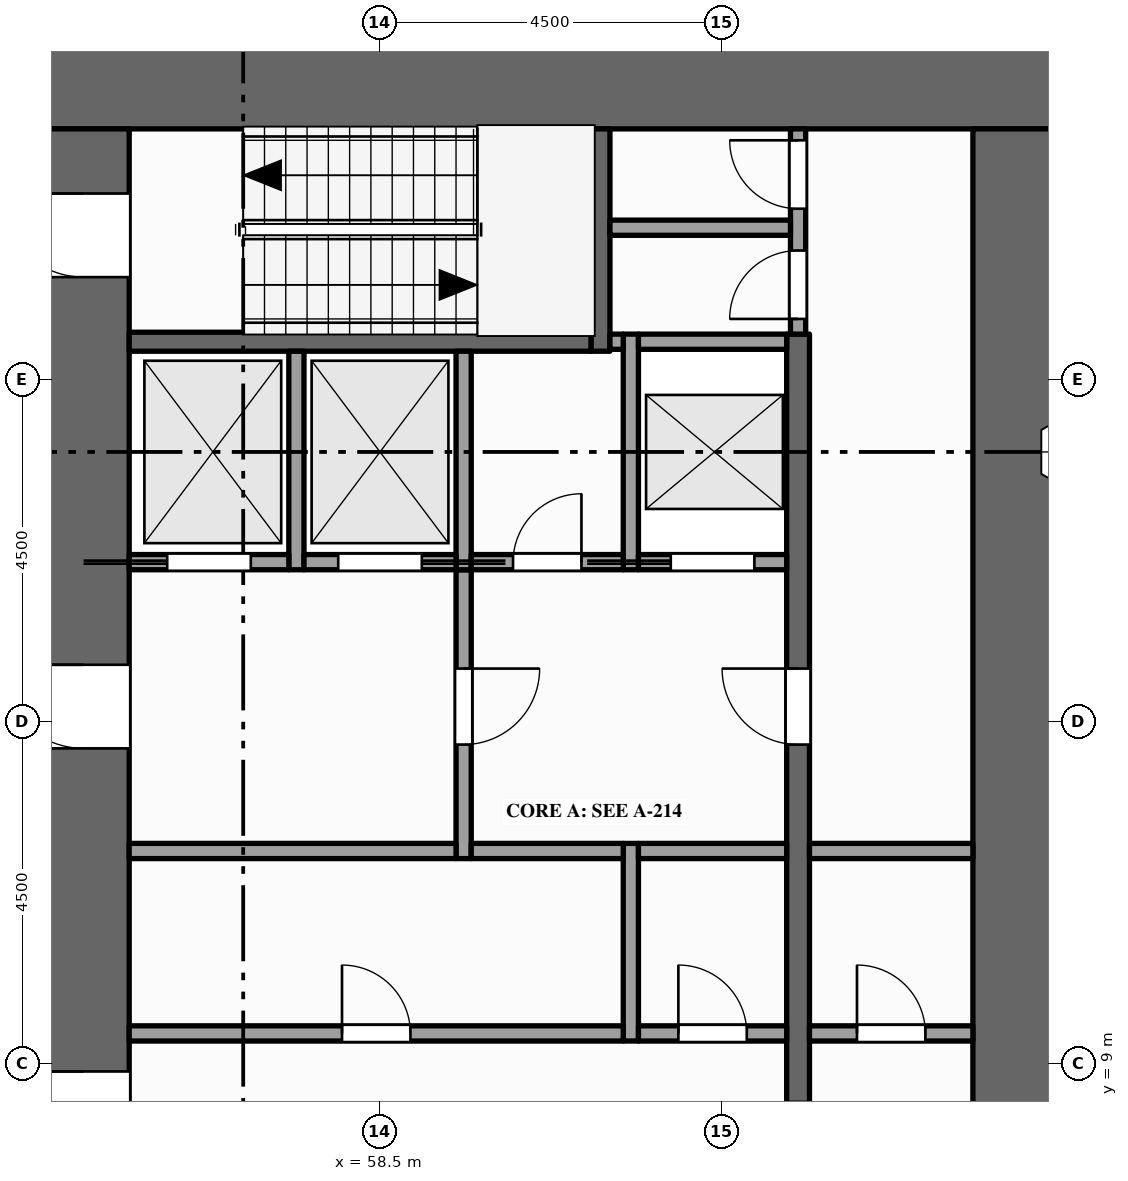
"""IFC4 building model, lengths in metres.
Left out: names, types, materials, properties, quantities, classifications, styles, units other than length and angle.
Written with IfcOpenShell. Run it as: python <this file> out.ifc"""

import sys

from ifc_helpers import new_model, si_unit, direction, frame, frame_2d, origin, place, context, subcontext, project, spatial, rectangle, extrude, element, fill, save


model = new_model("IFC4")
c1 = context("Model", 3, precision=1e-05, world=origin(), true_north=direction((0.0, 1.0)))
c2 = subcontext(c1, "Body", "Model", "MODEL_VIEW")
j1 = project(units=[si_unit("LENGTHUNIT", "METRE"), si_unit("PLANEANGLEUNIT", "RADIAN")], contexts=[c1])
p1 = place(None, origin())
s1 = spatial("IfcSite", under=j1, at=p1, CompositionType="ELEMENT")
p2 = place(p1, origin())
s2 = spatial("IfcBuilding", under=s1, at=p2, CompositionType="ELEMENT")
p3 = place(p2, frame((0.0, 0.0, 73.0)))
s3 = spatial("IfcBuildingStorey", under=s2, at=p3, CompositionType="ELEMENT", Elevation=73.0)
p4 = place(p3, frame((54.0, 21.9, -0.15), z_axis=(0.0, 0.0, 1.0), x_axis=(1.0, 0.0, 0.0)))
e1 = element("IfcWall", 1, at=p4, inside=s3, PredefinedType="SHEAR", context=c2, shape_type="SweptSolid", body=[
    extrude(rectangle(XDim=13.5, YDim=1.2, at=frame_2d((6.75, 0.0))), origin(), (0.0, 0.0, 1.0), 4.0),
])
p5 = place(p3, frame((54.6, 1.2, -0.15), z_axis=(0.0, 0.0, 1.0), x_axis=(0.0, 1.0, 0.0)))
e2 = element("IfcWall", 2, at=p5, inside=s3, PredefinedType="SHEAR", context=c2, shape_type="SweptSolid", body=[
    extrude(rectangle(XDim=20.1, YDim=1.2, at=frame_2d((10.05, 0.0))), origin(), (0.0, 0.0, 1.0), 4.0),
])
p6 = place(p5, frame((5.9, 0.0, 0.15)))
e3 = element("IfcOpeningElement", 3, at=p6, cuts=e2, PredefinedType="OPENING", context=c2, shape_type="SweptSolid", body=[
    extrude(rectangle(XDim=1.8, YDim=2.1, at=frame_2d((0.9, 1.05))), frame((0.0, 0.61, 0.0), z_axis=(0.0, -1.0, 0.0), x_axis=(1.0, 0.0, 0.0)), (0.0, 0.0, 1.0), 1.22),
])
p7 = place(p5, frame((11.95, 0.0, 0.15)))
e4 = element("IfcOpeningElement", 4, at=p7, cuts=e2, PredefinedType="OPENING", context=c2, shape_type="SweptSolid", body=[
    extrude(rectangle(XDim=1.1, YDim=2.1, at=frame_2d((0.55, 1.05))), frame((0.0, 0.61, 0.0), z_axis=(0.0, -1.0, 0.0), x_axis=(1.0, 0.0, 0.0)), (0.0, 0.0, 1.0), 1.22),
])
p8 = place(p5, frame((0.95, 0.0, 0.15)))
e5 = element("IfcOpeningElement", 5, at=p8, cuts=e2, PredefinedType="OPENING", context=c2, shape_type="SweptSolid", body=[
    extrude(rectangle(XDim=1.1, YDim=2.1, at=frame_2d((0.55, 1.05))), frame((0.0, 0.61, 0.0), z_axis=(0.0, -1.0, 0.0), x_axis=(1.0, 0.0, 0.0)), (0.0, 0.0, 1.0), 1.22),
])
p9 = place(p5, frame((18.15, 0.0, 0.15)))
e6 = element("IfcOpeningElement", 6, at=p9, cuts=e2, PredefinedType="OPENING", context=c2, shape_type="SweptSolid", body=[
    extrude(rectangle(XDim=1.1, YDim=2.1, at=frame_2d((0.55, 1.05))), frame((0.0, 0.61, 0.0), z_axis=(0.0, -1.0, 0.0), x_axis=(1.0, 0.0, 0.0)), (0.0, 0.0, 1.0), 1.22),
])
p10 = place(p3, frame((66.9, 1.2, -0.15), z_axis=(0.0, 0.0, 1.0), x_axis=(0.0, 1.0, 0.0)))
e7 = element("IfcWall", 7, at=p10, inside=s3, PredefinedType="SHEAR", context=c2, shape_type="SweptSolid", body=[
    extrude(rectangle(XDim=20.1, YDim=1.2, at=frame_2d((10.05, 0.0))), origin(), (0.0, 0.0, 1.0), 4.0),
])
p11 = place(p3, frame((57.4, 15.5, 0.0), z_axis=(0.0, 0.0, 1.0), x_axis=(0.0, 1.0, 0.0)))
e8 = element("IfcWall", 8, at=p11, inside=s3, PredefinedType="SOLIDWALL", context=c2, shape_type="SweptSolid", body=[
    extrude(rectangle(XDim=2.875, YDim=0.2, at=frame_2d((1.438, 0.0))), origin(), (0.0, 0.0, 1.0), 3.75),
])
p12 = place(p3, frame((59.6, 11.7, 0.0), z_axis=(0.0, 0.0, 1.0), x_axis=(0.0, 1.0, 0.0)))
e9 = element("IfcWall", 9, at=p12, inside=s3, PredefinedType="PARTITIONING", context=c2, shape_type="SweptSolid", body=[
    extrude(rectangle(XDim=3.8, YDim=0.2, at=frame_2d((1.9, 0.0))), origin(), (0.0, 0.0, 1.0), 3.75),
])
p13 = place(p12, frame((1.5, 0.0, 0.0)))
e10 = element("IfcOpeningElement", 10, at=p13, cuts=e9, PredefinedType="OPENING", context=c2, shape_type="SweptSolid", body=[
    extrude(rectangle(XDim=1.0, YDim=2.1, at=frame_2d((0.5, 1.05))), frame((0.0, 0.11, 0.0), z_axis=(0.0, -1.0, 0.0), x_axis=(1.0, 0.0, 0.0)), (0.0, 0.0, 1.0), 0.22),
])
p14 = place(p3, frame((59.6, 15.5, 0.0), z_axis=(0.0, 0.0, 1.0), x_axis=(0.0, 1.0, 0.0)))
e11 = element("IfcWall", 11, at=p14, inside=s3, PredefinedType="SOLIDWALL", context=c2, shape_type="SweptSolid", body=[
    extrude(rectangle(XDim=2.875, YDim=0.2, at=frame_2d((1.438, 0.0))), origin(), (0.0, 0.0, 1.0), 3.75),
])
p15 = place(p3, frame((61.4, 18.375, 0.0), z_axis=(0.0, 0.0, 1.0), x_axis=(0.0, 1.0, 0.0)))
e12 = element("IfcWall", 12, at=p15, inside=s3, PredefinedType="SHEAR", context=c2, shape_type="SweptSolid", body=[
    extrude(rectangle(XDim=2.925, YDim=0.25, at=frame_2d((1.462, 0.0))), origin(), (0.0, 0.0, 1.0), 3.75),
])
p16 = place(p3, frame((61.8, 9.3, 0.0), z_axis=(0.0, 0.0, 1.0), x_axis=(0.0, 1.0, 0.0)))
e13 = element("IfcWall", 13, at=p16, inside=s3, PredefinedType="PARTITIONING", context=c2, shape_type="SweptSolid", body=[
    extrude(rectangle(XDim=2.6, YDim=0.2, at=frame_2d((1.3, 0.0))), origin(), (0.0, 0.0, 1.0), 3.75),
])
p17 = place(p3, frame((61.8, 15.5, 0.0), z_axis=(0.0, 0.0, 1.0), x_axis=(0.0, 1.0, 0.0)))
e14 = element("IfcWall", 14, at=p17, inside=s3, PredefinedType="SOLIDWALL", context=c2, shape_type="SweptSolid", body=[
    extrude(rectangle(XDim=3.1, YDim=0.2, at=frame_2d((1.55, 0.0))), origin(), (0.0, 0.0, 1.0), 3.75),
])
p18 = place(p3, frame((64.0, 4.1, 0.0), z_axis=(0.0, 0.0, 1.0), x_axis=(0.0, 1.0, 0.0)))
e15 = element("IfcWall", 15, at=p18, inside=s3, PredefinedType="SHEAR", context=c2, shape_type="SweptSolid", body=[
    extrude(rectangle(XDim=14.5, YDim=0.3, at=frame_2d((7.25, 0.0))), origin(), (0.0, 0.0, 1.0), 3.75),
])
p19 = place(p18, frame((3.4, 0.0, 0.0)))
e16 = element("IfcOpeningElement", 16, at=p19, cuts=e15, PredefinedType="OPENING", context=c2, shape_type="SweptSolid", body=[
    extrude(rectangle(XDim=1.0, YDim=2.1, at=frame_2d((0.5, 1.05))), frame((0.0, 0.16, 0.0), z_axis=(0.0, -1.0, 0.0), x_axis=(1.0, 0.0, 0.0)), (0.0, 0.0, 1.0), 0.32),
])
p20 = place(p18, frame((9.1, 0.0, 0.0)))
e17 = element("IfcOpeningElement", 17, at=p20, cuts=e15, PredefinedType="OPENING", context=c2, shape_type="SweptSolid", body=[
    extrude(rectangle(XDim=1.0, YDim=2.1, at=frame_2d((0.5, 1.05))), frame((0.0, 0.16, 0.0), z_axis=(0.0, -1.0, 0.0), x_axis=(1.0, 0.0, 0.0)), (0.0, 0.0, 1.0), 0.32),
])
p21 = place(p3, frame((64.0, 18.6, 0.0), z_axis=(0.0, 0.0, 1.0), x_axis=(0.0, 1.0, 0.0)))
e18 = element("IfcWall", 18, at=p21, inside=s3, PredefinedType="PARTITIONING", context=c2, shape_type="SweptSolid", body=[
    extrude(rectangle(XDim=2.7, YDim=0.2, at=frame_2d((1.35, 0.0))), origin(), (0.0, 0.0, 1.0), 3.75),
])
p22 = place(p21, frame((0.2, 0.0, 0.0)))
e19 = element("IfcOpeningElement", 19, at=p22, cuts=e18, PredefinedType="OPENING", context=c2, shape_type="SweptSolid", body=[
    extrude(rectangle(XDim=0.9, YDim=2.1, at=frame_2d((0.45, 1.05))), frame((0.0, 0.11, 0.0), z_axis=(0.0, -1.0, 0.0), x_axis=(1.0, 0.0, 0.0)), (0.0, 0.0, 1.0), 0.22),
])
p23 = place(p21, frame((1.65, 0.0, 0.0)))
e20 = element("IfcOpeningElement", 20, at=p23, cuts=e18, PredefinedType="OPENING", context=c2, shape_type="SweptSolid", body=[
    extrude(rectangle(XDim=0.9, YDim=2.1, at=frame_2d((0.45, 1.05))), frame((0.0, 0.11, 0.0), z_axis=(0.0, -1.0, 0.0), x_axis=(1.0, 0.0, 0.0)), (0.0, 0.0, 1.0), 0.22),
])
p24 = place(p3, frame((55.2, 9.4, 0.0), z_axis=(0.0, 0.0, 1.0), x_axis=(1.0, 0.0, 0.0)))
e21 = element("IfcWall", 21, at=p24, inside=s3, PredefinedType="PARTITIONING", context=c2, shape_type="SweptSolid", body=[
    extrude(rectangle(XDim=6.5, YDim=0.2, at=frame_2d((3.25, 0.0))), origin(), (0.0, 0.0, 1.0), 3.75),
])
p25 = place(p24, frame((2.8, 0.0, 0.0)))
e22 = element("IfcOpeningElement", 22, at=p25, cuts=e21, PredefinedType="OPENING", context=c2, shape_type="SweptSolid", body=[
    extrude(rectangle(XDim=0.9, YDim=2.1, at=frame_2d((0.45, 1.05))), frame((0.0, 0.11, 0.0), z_axis=(0.0, -1.0, 0.0), x_axis=(1.0, 0.0, 0.0)), (0.0, 0.0, 1.0), 0.22),
])
p26 = place(p3, frame((61.9, 9.4, 0.0), z_axis=(0.0, 0.0, 1.0), x_axis=(1.0, 0.0, 0.0)))
e23 = element("IfcWall", 23, at=p26, inside=s3, PredefinedType="PARTITIONING", context=c2, shape_type="SweptSolid", body=[
    extrude(rectangle(XDim=1.95, YDim=0.2, at=frame_2d((0.975, 0.0))), origin(), (0.0, 0.0, 1.0), 3.75),
])
p27 = place(p26, frame((0.525, 0.0, 0.0)))
e24 = element("IfcOpeningElement", 24, at=p27, cuts=e23, PredefinedType="OPENING", context=c2, shape_type="SweptSolid", body=[
    extrude(rectangle(XDim=0.9, YDim=2.1, at=frame_2d((0.45, 1.05))), frame((0.0, 0.11, 0.0), z_axis=(0.0, -1.0, 0.0), x_axis=(1.0, 0.0, 0.0)), (0.0, 0.0, 1.0), 0.22),
])
p28 = place(p3, frame((64.15, 9.4, 0.0), z_axis=(0.0, 0.0, 1.0), x_axis=(1.0, 0.0, 0.0)))
e25 = element("IfcWall", 25, at=p28, inside=s3, PredefinedType="PARTITIONING", context=c2, shape_type="SweptSolid", body=[
    extrude(rectangle(XDim=2.15, YDim=0.2, at=frame_2d((1.075, 0.0))), origin(), (0.0, 0.0, 1.0), 3.75),
])
p29 = place(p28, frame((0.625, 0.0, 0.0)))
e26 = element("IfcOpeningElement", 26, at=p29, cuts=e25, PredefinedType="OPENING", context=c2, shape_type="SweptSolid", body=[
    extrude(rectangle(XDim=0.9, YDim=2.1, at=frame_2d((0.45, 1.05))), frame((0.0, 0.11, 0.0), z_axis=(0.0, -1.0, 0.0), x_axis=(1.0, 0.0, 0.0)), (0.0, 0.0, 1.0), 0.22),
])
p30 = place(p3, frame((55.2, 11.8, 0.0), z_axis=(0.0, 0.0, 1.0), x_axis=(1.0, 0.0, 0.0)))
e27 = element("IfcWall", 27, at=p30, inside=s3, PredefinedType="PARTITIONING", context=c2, shape_type="SweptSolid", body=[
    extrude(rectangle(XDim=4.3, YDim=0.2, at=frame_2d((2.15, 0.0))), origin(), (0.0, 0.0, 1.0), 3.75),
])
p31 = place(p3, frame((59.7, 11.8, 0.0), z_axis=(0.0, 0.0, 1.0), x_axis=(1.0, 0.0, 0.0)))
e28 = element("IfcWall", 28, at=p31, inside=s3, PredefinedType="PARTITIONING", context=c2, shape_type="SweptSolid", body=[
    extrude(rectangle(XDim=2.0, YDim=0.2, at=frame_2d((1.0, 0.0))), origin(), (0.0, 0.0, 1.0), 3.75),
])
p32 = place(p3, frame((61.9, 11.8, 0.0), z_axis=(0.0, 0.0, 1.0), x_axis=(1.0, 0.0, 0.0)))
e29 = element("IfcWall", 29, at=p32, inside=s3, PredefinedType="PARTITIONING", context=c2, shape_type="SweptSolid", body=[
    extrude(rectangle(XDim=1.95, YDim=0.2, at=frame_2d((0.975, 0.0))), origin(), (0.0, 0.0, 1.0), 3.75),
])
p33 = place(p3, frame((64.15, 11.8, 0.0), z_axis=(0.0, 0.0, 1.0), x_axis=(1.0, 0.0, 0.0)))
e30 = element("IfcWall", 30, at=p33, inside=s3, PredefinedType="PARTITIONING", context=c2, shape_type="SweptSolid", body=[
    extrude(rectangle(XDim=2.15, YDim=0.2, at=frame_2d((1.075, 0.0))), origin(), (0.0, 0.0, 1.0), 3.75),
])
p34 = place(p3, frame((55.2, 15.6, 0.0), z_axis=(0.0, 0.0, 1.0), x_axis=(1.0, 0.0, 0.0)))
e31 = element("IfcWall", 31, at=p34, inside=s3, PredefinedType="SOLIDWALL", context=c2, shape_type="SweptSolid", body=[
    extrude(rectangle(XDim=2.1, YDim=0.2, at=frame_2d((1.05, 0.0))), origin(), (0.0, 0.0, 1.0), 3.75),
])
p35 = place(p34, frame((0.5, 0.0, 0.012)))
e32 = element("IfcOpeningElement", 32, at=p35, cuts=e31, PredefinedType="OPENING", context=c2, shape_type="SweptSolid", body=[
    extrude(rectangle(XDim=1.1, YDim=2.1, at=frame_2d((0.55, 1.05))), frame((0.0, 0.11, 0.0), z_axis=(0.0, -1.0, 0.0), x_axis=(1.0, 0.0, 0.0)), (0.0, 0.0, 1.0), 0.22),
])
p36 = place(p3, frame((57.5, 15.6, 0.0), z_axis=(0.0, 0.0, 1.0), x_axis=(1.0, 0.0, 0.0)))
e33 = element("IfcWall", 33, at=p36, inside=s3, PredefinedType="SOLIDWALL", context=c2, shape_type="SweptSolid", body=[
    extrude(rectangle(XDim=2.0, YDim=0.2, at=frame_2d((1.0, 0.0))), origin(), (0.0, 0.0, 1.0), 3.75),
])
p37 = place(p36, frame((0.45, 0.0, 0.012)))
e34 = element("IfcOpeningElement", 34, at=p37, cuts=e33, PredefinedType="OPENING", context=c2, shape_type="SweptSolid", body=[
    extrude(rectangle(XDim=1.1, YDim=2.1, at=frame_2d((0.55, 1.05))), frame((0.0, 0.11, 0.0), z_axis=(0.0, -1.0, 0.0), x_axis=(1.0, 0.0, 0.0)), (0.0, 0.0, 1.0), 0.22),
])
p38 = place(p3, frame((59.7, 15.6, 0.0), z_axis=(0.0, 0.0, 1.0), x_axis=(1.0, 0.0, 0.0)))
e35 = element("IfcWall", 35, at=p38, inside=s3, PredefinedType="PARTITIONING", context=c2, shape_type="SweptSolid", body=[
    extrude(rectangle(XDim=2.0, YDim=0.2, at=frame_2d((1.0, 0.0))), origin(), (0.0, 0.0, 1.0), 3.75),
])
p39 = place(p38, frame((0.55, 0.0, 0.0)))
e36 = element("IfcOpeningElement", 36, at=p39, cuts=e35, PredefinedType="OPENING", context=c2, shape_type="SweptSolid", body=[
    extrude(rectangle(XDim=0.9, YDim=2.1, at=frame_2d((0.45, 1.05))), frame((0.0, 0.11, 0.0), z_axis=(0.0, -1.0, 0.0), x_axis=(1.0, 0.0, 0.0)), (0.0, 0.0, 1.0), 0.22),
])
p40 = place(p3, frame((61.9, 15.6, 0.0), z_axis=(0.0, 0.0, 1.0), x_axis=(1.0, 0.0, 0.0)))
e37 = element("IfcWall", 37, at=p40, inside=s3, PredefinedType="SOLIDWALL", context=c2, shape_type="SweptSolid", body=[
    extrude(rectangle(XDim=1.95, YDim=0.2, at=frame_2d((0.975, 0.0))), origin(), (0.0, 0.0, 1.0), 3.75),
])
p41 = place(p40, frame((0.425, 0.0, 0.012)))
e38 = element("IfcOpeningElement", 38, at=p41, cuts=e37, PredefinedType="OPENING", context=c2, shape_type="SweptSolid", body=[
    extrude(rectangle(XDim=1.1, YDim=2.1, at=frame_2d((0.55, 1.05))), frame((0.0, 0.11, 0.0), z_axis=(0.0, -1.0, 0.0), x_axis=(1.0, 0.0, 0.0)), (0.0, 0.0, 1.0), 0.22),
])
p42 = place(p3, frame((55.2, 18.5, 0.0), z_axis=(0.0, 0.0, 1.0), x_axis=(1.0, 0.0, 0.0)))
e39 = element("IfcWall", 39, at=p42, inside=s3, PredefinedType="SHEAR", context=c2, shape_type="SweptSolid", body=[
    extrude(rectangle(XDim=6.075, YDim=0.25, at=frame_2d((3.038, 0.0))), origin(), (0.0, 0.0, 1.0), 3.75),
])
p43 = place(p3, frame((61.525, 18.5, 0.0), z_axis=(0.0, 0.0, 1.0), x_axis=(1.0, 0.0, 0.0)))
e40 = element("IfcWall", 40, at=p43, inside=s3, PredefinedType="PARTITIONING", context=c2, shape_type="SweptSolid", body=[
    extrude(rectangle(XDim=0.175, YDim=0.2, at=frame_2d((0.087, 0.0))), origin(), (0.0, 0.0, 1.0), 3.75),
])
p44 = place(p3, frame((61.9, 18.5, 0.0), z_axis=(0.0, 0.0, 1.0), x_axis=(1.0, 0.0, 0.0)))
e41 = element("IfcWall", 41, at=p44, inside=s3, PredefinedType="SOLIDWALL", context=c2, shape_type="SweptSolid", body=[
    extrude(rectangle(XDim=1.95, YDim=0.2, at=frame_2d((0.975, 0.0))), origin(), (0.0, 0.0, 1.0), 3.75),
])
p45 = place(p3, frame((61.525, 20.0, 0.0), z_axis=(0.0, 0.0, 1.0), x_axis=(1.0, 0.0, 0.0)))
e42 = element("IfcWall", 42, at=p45, inside=s3, PredefinedType="PARTITIONING", context=c2, shape_type="SweptSolid", body=[
    extrude(rectangle(XDim=2.375, YDim=0.2, at=frame_2d((1.188, 0.0))), origin(), (0.0, 0.0, 1.0), 3.75),
])
p46 = place(p35, origin())
e43 = element("IfcDoor", 43, at=p46, inside=s3, OperationType="SLIDING_TO_LEFT", PredefinedType="DOOR", context=c2, shape_type="SweptSolid", body=[
    extrude(rectangle(XDim=1.1, YDim=2.1, at=frame_2d((0.55, 1.05))), frame((0.0, 0.025, 0.0), z_axis=(0.0, -1.0, 0.0), x_axis=(1.0, 0.0, 0.0)), (0.0, 0.0, 1.0), 0.05),
])
fill(e32, e43)
p47 = place(p37, origin())
e44 = element("IfcDoor", 44, at=p47, inside=s3, OperationType="SLIDING_TO_RIGHT", PredefinedType="DOOR", context=c2, shape_type="SweptSolid", body=[
    extrude(rectangle(XDim=1.1, YDim=2.1, at=frame_2d((0.55, 1.05))), frame((0.0, 0.025, 0.0), z_axis=(0.0, -1.0, 0.0), x_axis=(1.0, 0.0, 0.0)), (0.0, 0.0, 1.0), 0.05),
])
fill(e34, e44)
p48 = place(p41, origin())
e45 = element("IfcDoor", 45, at=p48, inside=s3, OperationType="SLIDING_TO_LEFT", PredefinedType="DOOR", context=c2, shape_type="SweptSolid", body=[
    extrude(rectangle(XDim=1.1, YDim=2.1, at=frame_2d((0.55, 1.05))), frame((0.0, 0.025, 0.0), z_axis=(0.0, -1.0, 0.0), x_axis=(1.0, 0.0, 0.0)), (0.0, 0.0, 1.0), 0.05),
])
fill(e38, e45)
p49 = place(p6, origin())
e46 = element("IfcDoor", 46, at=p49, inside=s3, OperationType="DOUBLE_DOOR_SINGLE_SWING", PredefinedType="DOOR", context=c2, shape_type="SweptSolid", body=[
    extrude(rectangle(XDim=1.8, YDim=2.1, at=frame_2d((0.9, 1.05))), frame((0.0, 0.025, 0.0), z_axis=(0.0, -1.0, 0.0), x_axis=(1.0, 0.0, 0.0)), (0.0, 0.0, 1.0), 0.05),
])
fill(e3, e46)
p50 = place(p7, origin())
e47 = element("IfcDoor", 47, at=p50, inside=s3, OperationType="SINGLE_SWING_RIGHT", PredefinedType="DOOR", context=c2, shape_type="SweptSolid", body=[
    extrude(rectangle(XDim=1.1, YDim=2.1, at=frame_2d((0.55, 1.05))), frame((0.0, 0.025, 0.0), z_axis=(0.0, -1.0, 0.0), x_axis=(1.0, 0.0, 0.0)), (0.0, 0.0, 1.0), 0.05),
])
fill(e4, e47)
p51 = place(p13, origin())
e48 = element("IfcDoor", 48, at=p51, inside=s3, OperationType="SINGLE_SWING_RIGHT", PredefinedType="DOOR", context=c2, shape_type="SweptSolid", body=[
    extrude(rectangle(XDim=1.0, YDim=2.1, at=frame_2d((0.5, 1.05))), frame((0.0, 0.025, 0.0), z_axis=(0.0, -1.0, 0.0), x_axis=(1.0, 0.0, 0.0)), (0.0, 0.0, 1.0), 0.05),
])
fill(e10, e48)
p52 = place(p20, origin())
e49 = element("IfcDoor", 49, at=p52, inside=s3, OperationType="SINGLE_SWING_RIGHT", PredefinedType="DOOR", context=c2, shape_type="SweptSolid", body=[
    extrude(rectangle(XDim=1.0, YDim=2.1, at=frame_2d((0.5, 1.05))), frame((0.0, 0.025, 0.0), z_axis=(0.0, -1.0, 0.0), x_axis=(1.0, 0.0, 0.0)), (0.0, 0.0, 1.0), 0.05),
])
fill(e17, e49)
p53 = place(p29, origin())
e50 = element("IfcDoor", 50, at=p53, inside=s3, OperationType="SINGLE_SWING_LEFT", PredefinedType="DOOR", context=c2, shape_type="SweptSolid", body=[
    extrude(rectangle(XDim=0.9, YDim=2.1, at=frame_2d((0.45, 1.05))), frame((0.0, 0.025, 0.0), z_axis=(0.0, -1.0, 0.0), x_axis=(1.0, 0.0, 0.0)), (0.0, 0.0, 1.0), 0.05),
])
fill(e26, e50)
p54 = place(p9, origin())
e51 = element("IfcDoor", 51, at=p54, inside=s3, OperationType="SINGLE_SWING_RIGHT", PredefinedType="DOOR", context=c2, shape_type="SweptSolid", body=[
    extrude(rectangle(XDim=1.1, YDim=2.1, at=frame_2d((0.55, 1.05))), frame((0.0, 0.025, 0.0), z_axis=(0.0, -1.0, 0.0), x_axis=(1.0, 0.0, 0.0)), (0.0, 0.0, 1.0), 0.05),
])
fill(e6, e51)
p55 = place(p22, origin())
e52 = element("IfcDoor", 52, at=p55, inside=s3, OperationType="SINGLE_SWING_LEFT", PredefinedType="DOOR", context=c2, shape_type="SweptSolid", body=[
    extrude(rectangle(XDim=0.9, YDim=2.1, at=frame_2d((0.45, 1.05))), frame((0.0, 0.025, 0.0), z_axis=(0.0, -1.0, 0.0), x_axis=(1.0, 0.0, 0.0)), (0.0, 0.0, 1.0), 0.05),
])
fill(e19, e52)
p56 = place(p23, origin())
e53 = element("IfcDoor", 53, at=p56, inside=s3, OperationType="SINGLE_SWING_RIGHT", PredefinedType="DOOR", context=c2, shape_type="SweptSolid", body=[
    extrude(rectangle(XDim=0.9, YDim=2.1, at=frame_2d((0.45, 1.05))), frame((0.0, 0.025, 0.0), z_axis=(0.0, -1.0, 0.0), x_axis=(1.0, 0.0, 0.0)), (0.0, 0.0, 1.0), 0.05),
])
fill(e20, e53)
p57 = place(p25, origin())
e54 = element("IfcDoor", 54, at=p57, inside=s3, OperationType="SINGLE_SWING_LEFT", PredefinedType="DOOR", context=c2, shape_type="SweptSolid", body=[
    extrude(rectangle(XDim=0.9, YDim=2.1, at=frame_2d((0.45, 1.05))), frame((0.0, 0.025, 0.0), z_axis=(0.0, -1.0, 0.0), x_axis=(1.0, 0.0, 0.0)), (0.0, 0.0, 1.0), 0.05),
])
fill(e22, e54)
p58 = place(p27, origin())
e55 = element("IfcDoor", 55, at=p58, inside=s3, OperationType="SINGLE_SWING_LEFT", PredefinedType="DOOR", context=c2, shape_type="SweptSolid", body=[
    extrude(rectangle(XDim=0.9, YDim=2.1, at=frame_2d((0.45, 1.05))), frame((0.0, 0.025, 0.0), z_axis=(0.0, -1.0, 0.0), x_axis=(1.0, 0.0, 0.0)), (0.0, 0.0, 1.0), 0.05),
])
fill(e24, e55)
p59 = place(p39, origin())
e56 = element("IfcDoor", 56, at=p59, inside=s3, OperationType="SINGLE_SWING_RIGHT", PredefinedType="DOOR", context=c2, shape_type="SweptSolid", body=[
    extrude(rectangle(XDim=0.9, YDim=2.1, at=frame_2d((0.45, 1.05))), frame((0.0, 0.025, 0.0), z_axis=(0.0, -1.0, 0.0), x_axis=(1.0, 0.0, 0.0)), (0.0, 0.0, 1.0), 0.05),
])
fill(e36, e56)
save(model, sys.argv[1])
